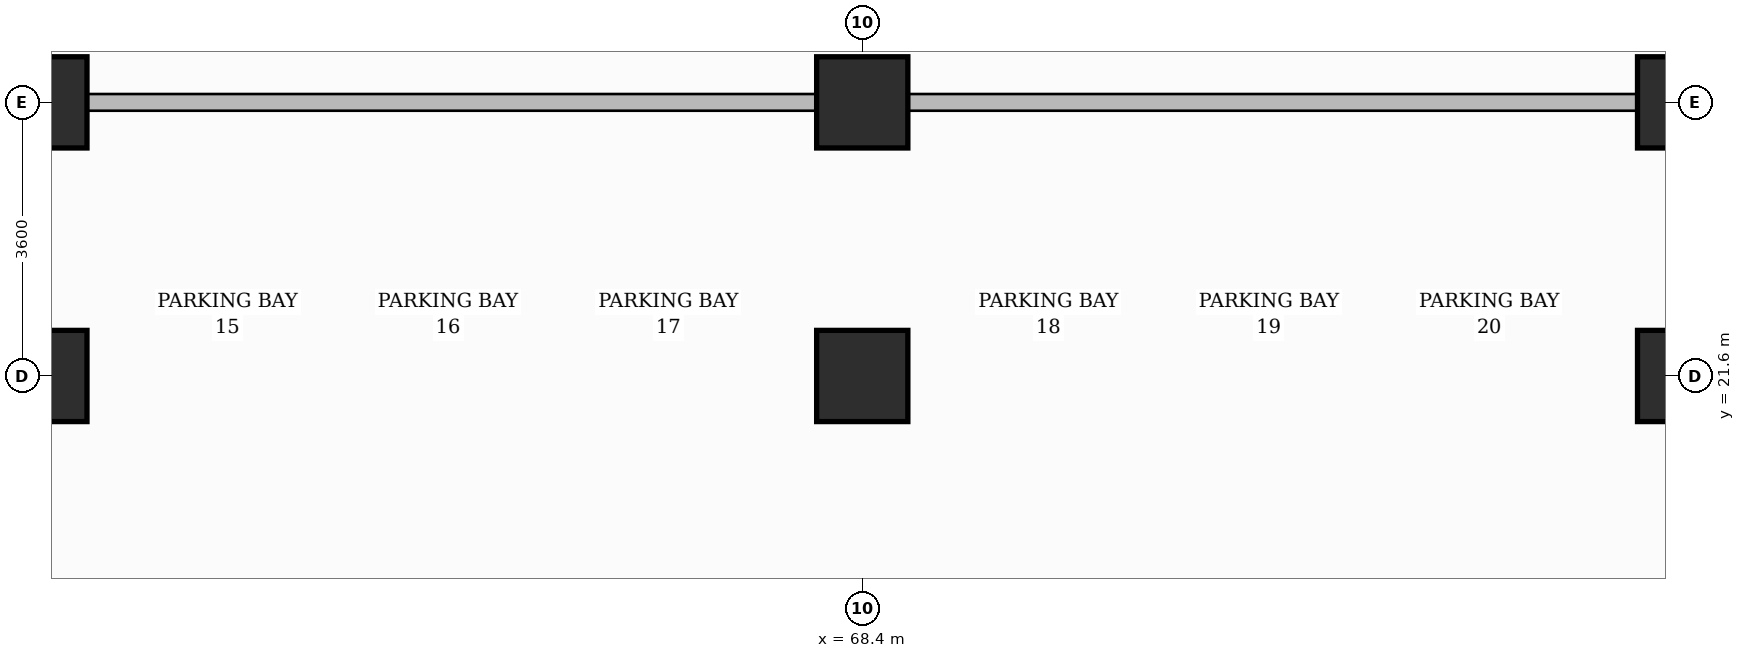
"""IFC4 building model, lengths in metres.
Left out: names, types, materials, properties, quantities, classifications, styles, units other than length and angle.
Written with IfcOpenShell. Run it as: python <this file> out.ifc"""

import sys

from ifc_helpers import new_model, si_unit, direction, frame, frame_2d, origin, origin_2d, place, context, subcontext, project, spatial, rectangle, extrude, source, transform, mapped, element, save


model = new_model("IFC4")
c1 = context("Model", 3, precision=1e-05, world=origin(), true_north=direction((0.0, 1.0)))
c2 = subcontext(c1, "Body", "Model", "MODEL_VIEW")
j1 = project(units=[si_unit("LENGTHUNIT", "METRE"), si_unit("PLANEANGLEUNIT", "RADIAN")], contexts=[c1])
p1 = place(None, origin())
s1 = spatial("IfcSite", under=j1, at=p1, CompositionType="ELEMENT")
p2 = place(p1, origin())
s2 = spatial("IfcBuilding", under=s1, at=p2, CompositionType="ELEMENT")
p3 = place(p2, frame((0.0, 0.0, -6.5)))
s3 = spatial("IfcBuildingStorey", under=s2, at=p3, CompositionType="ELEMENT", Elevation=-6.5)
m1 = source(origin(), c2, "Body", "SweptSolid", [
    extrude(rectangle(XDim=1.2, YDim=1.2, at=origin_2d()), origin(), (0.0, 0.0, 1.0), 6.5),
])
for number, where, z_axis, x_axis in (
    (1, (57.6, 21.6, 0.0), (0.0, 0.0, 1.0), (1.0, 0.0, 0.0)),
    (2, (57.6, 25.2, 0.0), (0.0, 0.0, 1.0), (1.0, 0.0, 0.0)),
    (3, (68.4, 21.6, 0.0), (0.0, 0.0, 1.0), (1.0, 0.0, 0.0)),
    (4, (68.4, 25.2, 0.0), (0.0, 0.0, 1.0), (1.0, 0.0, 0.0)),
    (5, (79.2, 21.6, 0.0), (0.0, 0.0, 1.0), (1.0, 0.0, 0.0)),
    (6, (79.2, 25.2, 0.0), (0.0, 0.0, 1.0), (1.0, 0.0, 0.0)),
):
    element("IfcColumn", number, at=place(p3, frame(where, z_axis=z_axis, x_axis=x_axis)), inside=s3, PredefinedType="COLUMN", context=c2, shape_type="MappedRepresentation", body=[
        mapped(m1, transform((0.0, 0.0, 0.0), scale=1.0)),
    ])
p4 = place(p3, frame((13.84, 25.2, 0.0), z_axis=(0.0, 0.0, 1.0), x_axis=(1.0, 0.0, 0.0)))
e7 = element("IfcWall", 7, at=p4, inside=s3, PredefinedType="PARTITIONING", context=c2, shape_type="SweptSolid", body=[
    extrude(rectangle(XDim=66.277, YDim=0.22, at=frame_2d((33.138, 0.0))), origin(), (0.0, 0.0, 1.0), 5.185),
])
p5 = place(p4, frame((11.91, 0.0, 0.0)))
e8 = element("IfcOpeningElement", 8, at=p5, cuts=e7, PredefinedType="OPENING", context=c2, shape_type="SweptSolid", body=[
    extrude(rectangle(XDim=1.5, YDim=2.2, at=frame_2d((0.75, 1.1))), frame((0.0, 0.12, 0.0), z_axis=(0.0, -1.0, 0.0), x_axis=(1.0, 0.0, 0.0)), (0.0, 0.0, 1.0), 0.24),
])
p6 = place(p4, frame((33.41, 0.0, 0.0)))
e9 = element("IfcOpeningElement", 9, at=p6, cuts=e7, PredefinedType="OPENING", context=c2, shape_type="SweptSolid", body=[
    extrude(rectangle(XDim=1.5, YDim=2.2, at=frame_2d((0.75, 1.1))), frame((0.0, 0.12, 0.0), z_axis=(0.0, -1.0, 0.0), x_axis=(1.0, 0.0, 0.0)), (0.0, 0.0, 1.0), 0.24),
])
save(model, sys.argv[1])
